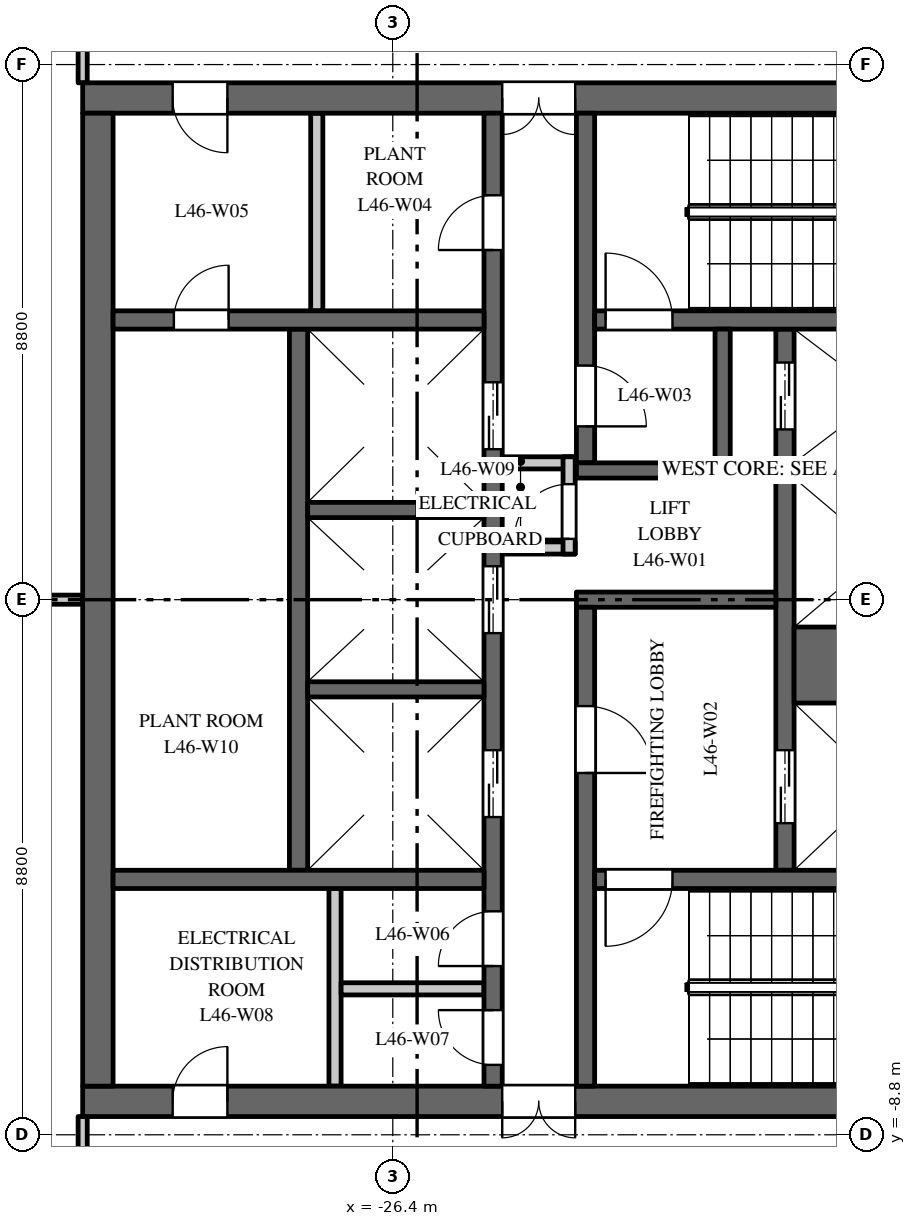
"""IFC4 building model, lengths in metres.
Left out: names, types, materials, properties, quantities, classifications, styles, units other than length and angle.
Written with IfcOpenShell. Run it as: python <this file> out.ifc"""

import sys

from ifc_helpers import new_model, si_unit, direction, frame, frame_2d, origin, place, context, subcontext, project, spatial, rectangle, extrude, element, fill, save


model = new_model("IFC4")
c1 = context("Model", 3, precision=1e-05, world=origin(), true_north=direction((0.0, 1.0)))
c2 = subcontext(c1, "Body", "Model", "MODEL_VIEW")
j1 = project(units=[si_unit("LENGTHUNIT", "METRE"), si_unit("PLANEANGLEUNIT", "RADIAN")], contexts=[c1])
p1 = place(None, origin())
s1 = spatial("IfcSite", under=j1, at=p1, CompositionType="ELEMENT")
p2 = place(p1, origin())
s2 = spatial("IfcBuilding", under=s1, at=p2, CompositionType="ELEMENT")
p3 = place(p2, frame((0.0, 0.0, 198.0)))
s3 = spatial("IfcBuildingStorey", under=s2, at=p3, CompositionType="ELEMENT", Elevation=198.0)
p4 = place(p3, frame((-16.5, 8.25, 0.0), z_axis=(0.0, 0.0, 1.0), x_axis=(-1.0, 0.0, 0.0)))
e1 = element("IfcWall", 1, at=p4, inside=s3, PredefinedType="SHEAR", context=c2, shape_type="SweptSolid", body=[
    extrude(rectangle(XDim=15.0, YDim=0.5, at=frame_2d((7.5, 0.0))), origin(), (0.0, 0.0, 1.0), 5.15),
])
p5 = place(p4, frame((6.9, 0.0, 0.0)))
e2 = element("IfcOpeningElement", 2, at=p5, cuts=e1, PredefinedType="OPENING", context=c2, shape_type="SweptSolid", body=[
    extrude(rectangle(XDim=1.2, YDim=2.1, at=frame_2d((0.6, 1.05))), frame((0.0, 0.26, 0.0), z_axis=(0.0, -1.0, 0.0), x_axis=(1.0, 0.0, 0.0)), (0.0, 0.0, 1.0), 0.52),
])
p6 = place(p4, frame((12.62, 0.0, 0.0)))
e3 = element("IfcOpeningElement", 3, at=p6, cuts=e1, PredefinedType="OPENING", context=c2, shape_type="SweptSolid", body=[
    extrude(rectangle(XDim=0.9, YDim=2.1, at=frame_2d((0.45, 1.05))), frame((0.0, 0.26, 0.0), z_axis=(0.0, -1.0, 0.0), x_axis=(1.0, 0.0, 0.0)), (0.0, 0.0, 1.0), 0.52),
])
p7 = place(p3, frame((-16.5, -8.25, 0.0), z_axis=(0.0, 0.0, 1.0), x_axis=(-1.0, 0.0, 0.0)))
e4 = element("IfcWall", 4, at=p7, inside=s3, PredefinedType="SHEAR", context=c2, shape_type="SweptSolid", body=[
    extrude(rectangle(XDim=15.0, YDim=0.5, at=frame_2d((7.5, 0.0))), origin(), (0.0, 0.0, 1.0), 5.15),
])
p8 = place(p7, frame((6.9, 0.0, 0.0)))
e5 = element("IfcOpeningElement", 5, at=p8, cuts=e4, PredefinedType="OPENING", context=c2, shape_type="SweptSolid", body=[
    extrude(rectangle(XDim=1.2, YDim=2.1, at=frame_2d((0.6, 1.05))), frame((0.0, 0.26, 0.0), z_axis=(0.0, -1.0, 0.0), x_axis=(1.0, 0.0, 0.0)), (0.0, 0.0, 1.0), 0.52),
])
p9 = place(p7, frame((12.62, 0.0, 0.0)))
e6 = element("IfcOpeningElement", 6, at=p9, cuts=e4, PredefinedType="OPENING", context=c2, shape_type="SweptSolid", body=[
    extrude(rectangle(XDim=0.9, YDim=2.1, at=frame_2d((0.45, 1.05))), frame((0.0, 0.26, 0.0), z_axis=(0.0, -1.0, 0.0), x_axis=(1.0, 0.0, 0.0)), (0.0, 0.0, 1.0), 0.52),
])
p10 = place(p3, frame((-27.95, -4.45, 0.0), z_axis=(0.0, 0.0, 1.0), x_axis=(0.0, 1.0, 0.0)))
e7 = element("IfcWall", 7, at=p10, inside=s3, PredefinedType="SHEAR", context=c2, shape_type="SweptSolid", body=[
    extrude(rectangle(XDim=8.9, YDim=0.3, at=frame_2d((4.45, 0.0))), origin(), (0.0, 0.0, 1.0), 5.15),
])
p11 = place(p3, frame((-19.95, -4.45, 0.0), z_axis=(0.0, 0.0, 1.0), x_axis=(0.0, 1.0, 0.0)))
e8 = element("IfcWall", 8, at=p11, inside=s3, PredefinedType="SHEAR", context=c2, shape_type="SweptSolid", body=[
    extrude(rectangle(XDim=8.9, YDim=0.3, at=frame_2d((4.45, 0.0))), origin(), (0.0, 0.0, 1.0), 5.15),
])
p12 = place(p11, frame((0.775, 0.0, 0.0)))
e9 = element("IfcOpeningElement", 9, at=p12, cuts=e8, PredefinedType="OPENING", context=c2, shape_type="SweptSolid", body=[
    extrude(rectangle(XDim=1.2, YDim=2.1, at=frame_2d((0.6, 1.05))), frame((0.0, 0.16, 0.0), z_axis=(0.0, -1.0, 0.0), x_axis=(1.0, 0.0, 0.0)), (0.0, 0.0, 1.0), 0.32),
])
p13 = place(p11, frame((7.25, 0.0, 0.0)))
e10 = element("IfcOpeningElement", 10, at=p13, cuts=e8, PredefinedType="OPENING", context=c2, shape_type="SweptSolid", body=[
    extrude(rectangle(XDim=1.1, YDim=2.1, at=frame_2d((0.55, 1.05))), frame((0.0, 0.16, 0.0), z_axis=(0.0, -1.0, 0.0), x_axis=(1.0, 0.0, 0.0)), (0.0, 0.0, 1.0), 0.32),
])
p14 = place(p3, frame((-24.75, -8.0, 0.0), z_axis=(0.0, 0.0, 1.0), x_axis=(0.0, 1.0, 0.0)))
e11 = element("IfcWall", 11, at=p14, inside=s3, PredefinedType="SHEAR", context=c2, shape_type="SweptSolid", body=[
    extrude(rectangle(XDim=16.0, YDim=0.3, at=frame_2d((8.0, 0.0))), origin(), (0.0, 0.0, 1.0), 5.15),
])
p15 = place(p14, frame((4.425, 0.0, 0.0)))
e12 = element("IfcOpeningElement", 12, at=p15, cuts=e11, PredefinedType="OPENING", context=c2, shape_type="SweptSolid", body=[
    extrude(rectangle(XDim=1.1, YDim=2.1, at=frame_2d((0.55, 1.05))), frame((0.0, 0.16, 0.0), z_axis=(0.0, -1.0, 0.0), x_axis=(1.0, 0.0, 0.0)), (0.0, 0.0, 1.0), 0.32),
])
p16 = place(p14, frame((7.45, 0.0, 0.0)))
e13 = element("IfcOpeningElement", 13, at=p16, cuts=e11, PredefinedType="OPENING", context=c2, shape_type="SweptSolid", body=[
    extrude(rectangle(XDim=1.1, YDim=2.1, at=frame_2d((0.55, 1.05))), frame((0.0, 0.16, 0.0), z_axis=(0.0, -1.0, 0.0), x_axis=(1.0, 0.0, 0.0)), (0.0, 0.0, 1.0), 0.32),
])
p17 = place(p14, frame((10.475, 0.0, 0.0)))
e14 = element("IfcOpeningElement", 14, at=p17, cuts=e11, PredefinedType="OPENING", context=c2, shape_type="SweptSolid", body=[
    extrude(rectangle(XDim=1.1, YDim=2.1, at=frame_2d((0.55, 1.05))), frame((0.0, 0.16, 0.0), z_axis=(0.0, -1.0, 0.0), x_axis=(1.0, 0.0, 0.0)), (0.0, 0.0, 1.0), 0.32),
])
p18 = place(p14, frame((13.75, 0.0, 0.0)))
e15 = element("IfcOpeningElement", 15, at=p18, cuts=e11, PredefinedType="OPENING", context=c2, shape_type="SweptSolid", body=[
    extrude(rectangle(XDim=0.9, YDim=2.1, at=frame_2d((0.45, 1.05))), frame((0.0, 0.16, 0.0), z_axis=(0.0, -1.0, 0.0), x_axis=(1.0, 0.0, 0.0)), (0.0, 0.0, 1.0), 0.32),
])
p19 = place(p14, frame((1.975, 0.0, 0.0)))
e16 = element("IfcOpeningElement", 16, at=p19, cuts=e11, PredefinedType="OPENING", context=c2, shape_type="SweptSolid", body=[
    extrude(rectangle(XDim=0.9, YDim=2.1, at=frame_2d((0.45, 1.05))), frame((0.0, 0.16, 0.0), z_axis=(0.0, -1.0, 0.0), x_axis=(1.0, 0.0, 0.0)), (0.0, 0.0, 1.0), 0.32),
])
p20 = place(p14, frame((0.35, 0.0, 0.0)))
e17 = element("IfcOpeningElement", 17, at=p20, cuts=e11, PredefinedType="OPENING", context=c2, shape_type="SweptSolid", body=[
    extrude(rectangle(XDim=0.9, YDim=2.1, at=frame_2d((0.45, 1.05))), frame((0.0, 0.16, 0.0), z_axis=(0.0, -1.0, 0.0), x_axis=(1.0, 0.0, 0.0)), (0.0, 0.0, 1.0), 0.32),
])
p21 = place(p3, frame((-20.1, 0.0, 0.0), z_axis=(0.0, 0.0, 1.0), x_axis=(-1.0, 0.0, 0.0)))
e18 = element("IfcWall", 18, at=p21, inside=s3, PredefinedType="SHEAR", context=c2, shape_type="SweptSolid", body=[
    extrude(rectangle(XDim=3.28, YDim=0.25, at=frame_2d((1.64, 0.0))), origin(), (0.0, 0.0, 1.0), 5.15),
])
for number, where, z_axis, x_axis in (
    (19, (-23.4, 0.85, 0.0), (0.0, 0.0, 1.0), (-1.0, 0.0, 0.0)),
    (20, (-23.4, 2.25, 0.0), (0.0, 0.0, 1.0), (-1.0, 0.0, 0.0)),
):
    element("IfcWall", number, at=place(p3, frame(where, z_axis=z_axis, x_axis=x_axis)), inside=s3, PredefinedType="PARTITIONING", context=c2, shape_type="SweptSolid", body=[
        extrude(rectangle(XDim=1.2, YDim=0.2, at=frame_2d((0.6, 0.0))), origin(), (0.0, 0.0, 1.0), 5.15),
    ])
p22 = place(p3, frame((-23.5, 0.75, 0.0), z_axis=(0.0, 0.0, 1.0), x_axis=(0.0, 1.0, 0.0)))
e21 = element("IfcWall", 21, at=p22, inside=s3, PredefinedType="PARTITIONING", context=c2, shape_type="SweptSolid", body=[
    extrude(rectangle(XDim=1.6, YDim=0.2, at=frame_2d((0.8, 0.0))), origin(), (0.0, 0.0, 1.0), 5.15),
])
p23 = place(p22, frame((0.25, 0.0, 0.0)))
e22 = element("IfcOpeningElement", 22, at=p23, cuts=e21, PredefinedType="OPENING", context=c2, shape_type="SweptSolid", body=[
    extrude(rectangle(XDim=0.9, YDim=2.1, at=frame_2d((0.45, 1.05))), frame((0.0, 0.11, 0.0), z_axis=(0.0, -1.0, 0.0), x_axis=(1.0, 0.0, 0.0)), (0.0, 0.0, 1.0), 0.22),
])
p24 = place(p3, frame((-31.25, -8.0, 0.0), z_axis=(0.0, 0.0, 1.0), x_axis=(0.0, 1.0, 0.0)))
e23 = element("IfcWall", 23, at=p24, inside=s3, PredefinedType="SHEAR", context=c2, shape_type="SweptSolid", body=[
    extrude(rectangle(XDim=16.0, YDim=0.5, at=frame_2d((8.0, 0.0))), origin(), (0.0, 0.0, 1.0), 5.15),
])
p25 = place(p3, frame((-24.9, 4.6, 0.0), z_axis=(0.0, 0.0, 1.0), x_axis=(-1.0, 0.0, 0.0)))
e24 = element("IfcWall", 24, at=p25, inside=s3, PredefinedType="SHEAR", context=c2, shape_type="SweptSolid", body=[
    extrude(rectangle(XDim=6.1, YDim=0.3, at=frame_2d((3.05, 0.0))), origin(), (0.0, 0.0, 1.0), 5.15),
])
p26 = place(p25, frame((4.2, 0.0, 0.0)))
e25 = element("IfcOpeningElement", 25, at=p26, cuts=e24, PredefinedType="OPENING", context=c2, shape_type="SweptSolid", body=[
    extrude(rectangle(XDim=0.9, YDim=2.1, at=frame_2d((0.45, 1.05))), frame((0.0, 0.16, 0.0), z_axis=(0.0, -1.0, 0.0), x_axis=(1.0, 0.0, 0.0)), (0.0, 0.0, 1.0), 0.32),
])
for number, where, z_axis, x_axis in (
    (26, (-27.65, 4.75, 0.0), (0.0, 0.0, 1.0), (0.0, 1.0, 0.0)),
    (27, (-27.35, -8.0, 0.0), (0.0, 0.0, 1.0), (0.0, 1.0, 0.0)),
):
    element("IfcWall", number, at=place(p3, frame(where, z_axis=z_axis, x_axis=x_axis)), inside=s3, PredefinedType="PARTITIONING", context=c2, shape_type="SweptSolid", body=[
        extrude(rectangle(XDim=3.25, YDim=0.2, at=frame_2d((1.625, 0.0))), origin(), (0.0, 0.0, 1.0), 5.15),
    ])
p27 = place(p3, frame((-24.9, -6.4, 0.0), z_axis=(0.0, 0.0, 1.0), x_axis=(-1.0, 0.0, 0.0)))
e28 = element("IfcWall", 28, at=p27, inside=s3, PredefinedType="PARTITIONING", context=c2, shape_type="SweptSolid", body=[
    extrude(rectangle(XDim=2.35, YDim=0.2, at=frame_2d((1.175, 0.0))), origin(), (0.0, 0.0, 1.0), 5.15),
])
p28 = place(p3, frame((-24.9, -4.6, 0.0), z_axis=(0.0, 0.0, 1.0), x_axis=(-1.0, 0.0, 0.0)))
e29 = element("IfcWall", 29, at=p28, inside=s3, PredefinedType="SHEAR", context=c2, shape_type="SweptSolid", body=[
    extrude(rectangle(XDim=6.1, YDim=0.3, at=frame_2d((3.05, 0.0))), origin(), (0.0, 0.0, 1.0), 5.15),
])
p29 = place(p3, frame((-16.9, -1.075, 0.0), z_axis=(0.0, 0.0, 1.0), x_axis=(-1.0, 0.0, 0.0)))
e30 = element("IfcWall", 30, at=p29, inside=s3, PredefinedType="SHEAR", context=c2, shape_type="SweptSolid", body=[
    extrude(rectangle(XDim=2.9, YDim=1.25, at=frame_2d((1.45, 0.0))), origin(), (0.0, 0.0, 1.0), 5.15),
])
for number, where, z_axis, x_axis in (
    (31, (-16.9, 2.125, 0.0), (0.0, 0.0, 1.0), (-1.0, 0.0, 0.0)),
    (32, (-24.9, -1.475, 0.0), (0.0, 0.0, 1.0), (-1.0, 0.0, 0.0)),
    (33, (-24.9, 1.475, 0.0), (0.0, 0.0, 1.0), (-1.0, 0.0, 0.0)),
):
    element("IfcWall", number, at=place(p3, frame(where, z_axis=z_axis, x_axis=x_axis)), inside=s3, PredefinedType="SHEAR", context=c2, shape_type="SweptSolid", body=[
        extrude(rectangle(XDim=2.9, YDim=0.25, at=frame_2d((1.45, 0.0))), origin(), (0.0, 0.0, 1.0), 5.15),
    ])
p30 = place(p3, frame((-23.23, 2.25, 0.0), z_axis=(0.0, 0.0, 1.0), x_axis=(0.0, 1.0, 0.0)))
e34 = element("IfcWall", 34, at=p30, inside=s3, PredefinedType="SHEAR", context=c2, shape_type="SweptSolid", body=[
    extrude(rectangle(XDim=5.75, YDim=0.3, at=frame_2d((2.875, 0.0))), origin(), (0.0, 0.0, 1.0), 5.15),
])
p31 = place(p30, frame((0.6, 0.0, 0.0)))
e35 = element("IfcOpeningElement", 35, at=p31, cuts=e34, PredefinedType="OPENING", context=c2, shape_type="SweptSolid", body=[
    extrude(rectangle(XDim=1.0, YDim=2.1, at=frame_2d((0.5, 1.05))), frame((0.0, 0.16, 0.0), z_axis=(0.0, -1.0, 0.0), x_axis=(1.0, 0.0, 0.0)), (0.0, 0.0, 1.0), 0.32),
])
p32 = place(p3, frame((-23.23, -8.0, 0.0), z_axis=(0.0, 0.0, 1.0), x_axis=(0.0, 1.0, 0.0)))
e36 = element("IfcWall", 36, at=p32, inside=s3, PredefinedType="SHEAR", context=c2, shape_type="SweptSolid", body=[
    extrude(rectangle(XDim=7.875, YDim=0.3, at=frame_2d((3.938, 0.0))), origin(), (0.0, 0.0, 1.0), 5.15),
])
p33 = place(p32, frame((5.15, 0.0, 0.0)))
e37 = element("IfcOpeningElement", 37, at=p33, cuts=e36, PredefinedType="OPENING", context=c2, shape_type="SweptSolid", body=[
    extrude(rectangle(XDim=1.1, YDim=2.1, at=frame_2d((0.55, 1.05))), frame((0.0, 0.16, 0.0), z_axis=(0.0, -1.0, 0.0), x_axis=(1.0, 0.0, 0.0)), (0.0, 0.0, 1.0), 0.32),
])
p34 = place(p3, frame((-16.9, 4.6, 0.0), z_axis=(0.0, 0.0, 1.0), x_axis=(-1.0, 0.0, 0.0)))
e38 = element("IfcWall", 38, at=p34, inside=s3, PredefinedType="SHEAR", context=c2, shape_type="SweptSolid", body=[
    extrude(rectangle(XDim=6.18, YDim=0.3, at=frame_2d((3.09, 0.0))), origin(), (0.0, 0.0, 1.0), 5.15),
])
p35 = place(p34, frame((4.9, 0.0, 0.0)))
e39 = element("IfcOpeningElement", 39, at=p35, cuts=e38, PredefinedType="OPENING", context=c2, shape_type="SweptSolid", body=[
    extrude(rectangle(XDim=1.1, YDim=2.1, at=frame_2d((0.55, 1.05))), frame((0.0, 0.16, 0.0), z_axis=(0.0, -1.0, 0.0), x_axis=(1.0, 0.0, 0.0)), (0.0, 0.0, 1.0), 0.32),
])
p36 = place(p3, frame((-16.9, -4.6, 0.0), z_axis=(0.0, 0.0, 1.0), x_axis=(-1.0, 0.0, 0.0)))
e40 = element("IfcWall", 40, at=p36, inside=s3, PredefinedType="SHEAR", context=c2, shape_type="SweptSolid", body=[
    extrude(rectangle(XDim=6.18, YDim=0.3, at=frame_2d((3.09, 0.0))), origin(), (0.0, 0.0, 1.0), 5.15),
])
p37 = place(p36, frame((4.9, 0.0, 0.0)))
e41 = element("IfcOpeningElement", 41, at=p37, cuts=e40, PredefinedType="OPENING", context=c2, shape_type="SweptSolid", body=[
    extrude(rectangle(XDim=1.1, YDim=2.1, at=frame_2d((0.55, 1.05))), frame((0.0, 0.16, 0.0), z_axis=(0.0, -1.0, 0.0), x_axis=(1.0, 0.0, 0.0)), (0.0, 0.0, 1.0), 0.32),
])
p38 = place(p3, frame((-20.85, 2.125, 0.0), z_axis=(0.0, 0.0, 1.0), x_axis=(-1.0, 0.0, 0.0)))
e42 = element("IfcWall", 42, at=p38, inside=s3, PredefinedType="SHEAR", context=c2, shape_type="SweptSolid", body=[
    extrude(rectangle(XDim=2.53, YDim=0.25, at=frame_2d((1.265, 0.0))), origin(), (0.0, 0.0, 1.0), 5.15),
])
p39 = place(p3, frame((-20.975, 2.25, 0.0), z_axis=(0.0, 0.0, 1.0), x_axis=(0.0, 1.0, 0.0)))
e43 = element("IfcWall", 43, at=p39, inside=s3, PredefinedType="SHEAR", context=c2, shape_type="SweptSolid", body=[
    extrude(rectangle(XDim=2.2, YDim=0.25, at=frame_2d((1.1, 0.0))), origin(), (0.0, 0.0, 1.0), 5.15),
])
p40 = place(p3, frame((-35.045, 0.0, 0.0), z_axis=(0.0, 0.0, 1.0), x_axis=(1.0, 0.0, 0.0)))
e44 = element("IfcWall", 44, at=p40, inside=s3, PredefinedType="PARTITIONING", context=c2, shape_type="SweptSolid", body=[
    extrude(rectangle(XDim=3.545, YDim=0.15, at=frame_2d((1.772, 0.0))), origin(), (0.0, 0.0, 1.0), 5.15),
])
for number, where, z_axis, x_axis in (
    (45, (-31.5, -10.7, 0.0), (0.0, 0.0, 1.0), (0.0, 1.0, 0.0)),
    (46, (-31.5, 8.5, 0.0), (0.0, 0.0, 1.0), (0.0, 1.0, 0.0)),
):
    element("IfcWall", number, at=place(p3, frame(where, z_axis=z_axis, x_axis=x_axis)), inside=s3, PredefinedType="PARTITIONING", context=c2, shape_type="SweptSolid", body=[
        extrude(rectangle(XDim=2.2, YDim=0.15, at=frame_2d((1.1, 0.0))), origin(), (0.0, 0.0, 1.0), 5.15),
    ])
p41 = place(p12, origin())
e47 = element("IfcDoor", 47, at=p41, inside=s3, OperationType="DOUBLE_DOOR_SLIDING", PredefinedType="DOOR", context=c2, shape_type="SweptSolid", body=[
    extrude(rectangle(XDim=1.2, YDim=2.1, at=frame_2d((0.6, 1.05))), frame((0.0, 0.025, 0.0), z_axis=(0.0, -1.0, 0.0), x_axis=(1.0, 0.0, 0.0)), (0.0, 0.0, 1.0), 0.05),
])
fill(e9, e47)
p42 = place(p13, origin())
e48 = element("IfcDoor", 48, at=p42, inside=s3, OperationType="DOUBLE_DOOR_SLIDING", PredefinedType="DOOR", context=c2, shape_type="SweptSolid", body=[
    extrude(rectangle(XDim=1.1, YDim=2.1, at=frame_2d((0.55, 1.05))), frame((0.0, 0.025, 0.0), z_axis=(0.0, -1.0, 0.0), x_axis=(1.0, 0.0, 0.0)), (0.0, 0.0, 1.0), 0.05),
])
fill(e10, e48)
p43 = place(p15, origin())
e49 = element("IfcDoor", 49, at=p43, inside=s3, OperationType="DOUBLE_DOOR_SLIDING", PredefinedType="DOOR", context=c2, shape_type="SweptSolid", body=[
    extrude(rectangle(XDim=1.1, YDim=2.1, at=frame_2d((0.55, 1.05))), frame((0.0, 0.025, 0.0), z_axis=(0.0, -1.0, 0.0), x_axis=(1.0, 0.0, 0.0)), (0.0, 0.0, 1.0), 0.05),
])
fill(e12, e49)
p44 = place(p16, origin())
e50 = element("IfcDoor", 50, at=p44, inside=s3, OperationType="DOUBLE_DOOR_SLIDING", PredefinedType="DOOR", context=c2, shape_type="SweptSolid", body=[
    extrude(rectangle(XDim=1.1, YDim=2.1, at=frame_2d((0.55, 1.05))), frame((0.0, 0.025, 0.0), z_axis=(0.0, -1.0, 0.0), x_axis=(1.0, 0.0, 0.0)), (0.0, 0.0, 1.0), 0.05),
])
fill(e13, e50)
p45 = place(p17, origin())
e51 = element("IfcDoor", 51, at=p45, inside=s3, OperationType="DOUBLE_DOOR_SLIDING", PredefinedType="DOOR", context=c2, shape_type="SweptSolid", body=[
    extrude(rectangle(XDim=1.1, YDim=2.1, at=frame_2d((0.55, 1.05))), frame((0.0, 0.025, 0.0), z_axis=(0.0, -1.0, 0.0), x_axis=(1.0, 0.0, 0.0)), (0.0, 0.0, 1.0), 0.05),
])
fill(e14, e51)
p46 = place(p35, origin())
e52 = element("IfcDoor", 52, at=p46, inside=s3, OperationType="SINGLE_SWING_RIGHT", PredefinedType="DOOR", context=c2, shape_type="SweptSolid", body=[
    extrude(rectangle(XDim=1.1, YDim=2.1, at=frame_2d((0.55, 1.05))), frame((0.0, 0.025, 0.0), z_axis=(0.0, -1.0, 0.0), x_axis=(1.0, 0.0, 0.0)), (0.0, 0.0, 1.0), 0.05),
])
fill(e39, e52)
p47 = place(p37, origin())
e53 = element("IfcDoor", 53, at=p47, inside=s3, OperationType="SINGLE_SWING_LEFT", PredefinedType="DOOR", context=c2, shape_type="SweptSolid", body=[
    extrude(rectangle(XDim=1.1, YDim=2.1, at=frame_2d((0.55, 1.05))), frame((0.0, 0.025, 0.0), z_axis=(0.0, -1.0, 0.0), x_axis=(1.0, 0.0, 0.0)), (0.0, 0.0, 1.0), 0.05),
])
fill(e41, e53)
p48 = place(p33, origin())
e54 = element("IfcDoor", 54, at=p48, inside=s3, OperationType="SINGLE_SWING_LEFT", PredefinedType="DOOR", context=c2, shape_type="SweptSolid", body=[
    extrude(rectangle(XDim=1.1, YDim=2.1, at=frame_2d((0.55, 1.05))), frame((0.0, 0.025, 0.0), z_axis=(0.0, -1.0, 0.0), x_axis=(1.0, 0.0, 0.0)), (0.0, 0.0, 1.0), 0.05),
])
fill(e37, e54)
p49 = place(p31, origin())
e55 = element("IfcDoor", 55, at=p49, inside=s3, OperationType="SINGLE_SWING_LEFT", PredefinedType="DOOR", context=c2, shape_type="SweptSolid", body=[
    extrude(rectangle(XDim=1.0, YDim=2.1, at=frame_2d((0.5, 1.05))), frame((0.0, 0.025, 0.0), z_axis=(0.0, -1.0, 0.0), x_axis=(1.0, 0.0, 0.0)), (0.0, 0.0, 1.0), 0.05),
])
fill(e35, e55)
p50 = place(p5, origin())
e56 = element("IfcDoor", 56, at=p50, inside=s3, OperationType="DOUBLE_DOOR_DOUBLE_SWING", PredefinedType="DOOR", context=c2, shape_type="SweptSolid", body=[
    extrude(rectangle(XDim=1.2, YDim=2.1, at=frame_2d((0.6, 1.05))), frame((0.0, 0.025, 0.0), z_axis=(0.0, -1.0, 0.0), x_axis=(1.0, 0.0, 0.0)), (0.0, 0.0, 1.0), 0.05),
])
fill(e2, e56)
p51 = place(p8, origin())
e57 = element("IfcDoor", 57, at=p51, inside=s3, OperationType="DOUBLE_DOOR_DOUBLE_SWING", PredefinedType="DOOR", context=c2, shape_type="SweptSolid", body=[
    extrude(rectangle(XDim=1.2, YDim=2.1, at=frame_2d((0.6, 1.05))), frame((0.0, 0.025, 0.0), z_axis=(0.0, -1.0, 0.0), x_axis=(1.0, 0.0, 0.0)), (0.0, 0.0, 1.0), 0.05),
])
fill(e5, e57)
p52 = place(p18, origin())
e58 = element("IfcDoor", 58, at=p52, inside=s3, OperationType="SINGLE_SWING_RIGHT", PredefinedType="DOOR", context=c2, shape_type="SweptSolid", body=[
    extrude(rectangle(XDim=0.9, YDim=2.1, at=frame_2d((0.45, 1.05))), frame((0.0, 0.025, 0.0), z_axis=(0.0, -1.0, 0.0), x_axis=(1.0, 0.0, 0.0)), (0.0, 0.0, 1.0), 0.05),
])
fill(e15, e58)
p53 = place(p6, origin())
e59 = element("IfcDoor", 59, at=p53, inside=s3, OperationType="SINGLE_SWING_RIGHT", PredefinedType="DOOR", context=c2, shape_type="SweptSolid", body=[
    extrude(rectangle(XDim=0.9, YDim=2.1, at=frame_2d((0.45, 1.05))), frame((0.0, 0.025, 0.0), z_axis=(0.0, -1.0, 0.0), x_axis=(1.0, 0.0, 0.0)), (0.0, 0.0, 1.0), 0.05),
])
fill(e3, e59)
p54 = place(p19, origin())
e60 = element("IfcDoor", 60, at=p54, inside=s3, OperationType="SINGLE_SWING_RIGHT", PredefinedType="DOOR", context=c2, shape_type="SweptSolid", body=[
    extrude(rectangle(XDim=0.9, YDim=2.1, at=frame_2d((0.45, 1.05))), frame((0.0, 0.025, 0.0), z_axis=(0.0, -1.0, 0.0), x_axis=(1.0, 0.0, 0.0)), (0.0, 0.0, 1.0), 0.05),
])
fill(e16, e60)
p55 = place(p20, origin())
e61 = element("IfcDoor", 61, at=p55, inside=s3, OperationType="SINGLE_SWING_LEFT", PredefinedType="DOOR", context=c2, shape_type="SweptSolid", body=[
    extrude(rectangle(XDim=0.9, YDim=2.1, at=frame_2d((0.45, 1.05))), frame((0.0, 0.025, 0.0), z_axis=(0.0, -1.0, 0.0), x_axis=(1.0, 0.0, 0.0)), (0.0, 0.0, 1.0), 0.05),
])
fill(e17, e61)
p56 = place(p9, origin())
e62 = element("IfcDoor", 62, at=p56, inside=s3, OperationType="SINGLE_SWING_LEFT", PredefinedType="DOOR", context=c2, shape_type="SweptSolid", body=[
    extrude(rectangle(XDim=0.9, YDim=2.1, at=frame_2d((0.45, 1.05))), frame((0.0, 0.025, 0.0), z_axis=(0.0, -1.0, 0.0), x_axis=(1.0, 0.0, 0.0)), (0.0, 0.0, 1.0), 0.05),
])
fill(e6, e62)
p57 = place(p23, origin())
e63 = element("IfcDoor", 63, at=p57, inside=s3, OperationType="SINGLE_SWING_RIGHT", PredefinedType="DOOR", context=c2, shape_type="SweptSolid", body=[
    extrude(rectangle(XDim=0.9, YDim=2.1, at=frame_2d((0.45, 1.05))), frame((0.0, 0.025, 0.0), z_axis=(0.0, -1.0, 0.0), x_axis=(1.0, 0.0, 0.0)), (0.0, 0.0, 1.0), 0.05),
])
fill(e22, e63)
p58 = place(p26, origin())
e64 = element("IfcDoor", 64, at=p58, inside=s3, OperationType="SINGLE_SWING_LEFT", PredefinedType="DOOR", context=c2, shape_type="SweptSolid", body=[
    extrude(rectangle(XDim=0.9, YDim=2.1, at=frame_2d((0.45, 1.05))), frame((0.0, 0.025, 0.0), z_axis=(0.0, -1.0, 0.0), x_axis=(1.0, 0.0, 0.0)), (0.0, 0.0, 1.0), 0.05),
])
fill(e25, e64)
save(model, sys.argv[1])
